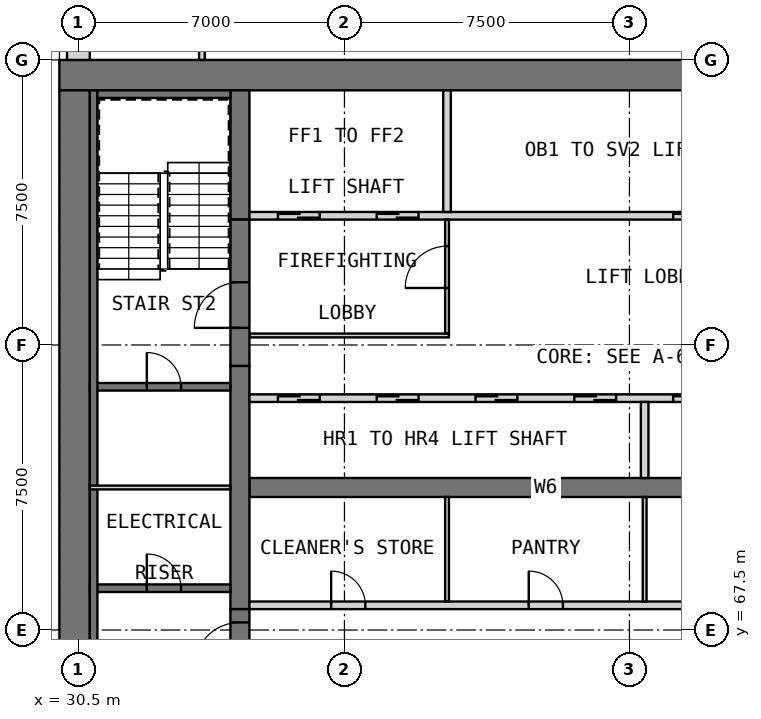
"""IFC4 building model, lengths in metres.
Left out: names, types, materials, properties, quantities, classifications, styles, units other than length and angle.
Written with IfcOpenShell. Run it as: python <this file> out.ifc"""

import sys

from ifc_helpers import new_model, si_unit, direction, frame, frame_2d, origin, place, context, subcontext, project, spatial, rectangle, extrude, element, fill, save


model = new_model("IFC4")
c1 = context("Model", 3, precision=1e-05, world=origin(), true_north=direction((0.0, 1.0)))
c2 = subcontext(c1, "Body", "Model", "MODEL_VIEW")
j1 = project(units=[si_unit("LENGTHUNIT", "METRE"), si_unit("PLANEANGLEUNIT", "RADIAN")], contexts=[c1])
p1 = place(None, origin())
s1 = spatial("IfcSite", under=j1, at=p1, CompositionType="ELEMENT")
p2 = place(p1, origin())
s2 = spatial("IfcBuilding", under=s1, at=p2, CompositionType="ELEMENT")
p3 = place(p2, frame((0.0, 0.0, 210.7)))
s3 = spatial("IfcBuildingStorey", under=s2, at=p3, CompositionType="ELEMENT", Elevation=210.7)
p4 = place(p3, frame((30.0, 82.1, 0.0), z_axis=(0.0, 0.0, 1.0), x_axis=(1.0, 0.0, 0.0)))
e1 = element("IfcWall", 1, at=p4, inside=s3, PredefinedType="SHEAR", context=c2, shape_type="SweptSolid", body=[
    extrude(rectangle(XDim=30.0, YDim=0.8, at=frame_2d((15.0, 0.0))), origin(), (0.0, 0.0, 1.0), 3.5),
])
p5 = place(p3, frame((30.4, 60.8, 0.0), z_axis=(0.0, 0.0, 1.0), x_axis=(0.0, 1.0, 0.0)))
e2 = element("IfcWall", 2, at=p5, inside=s3, PredefinedType="SHEAR", context=c2, shape_type="SweptSolid", body=[
    extrude(rectangle(XDim=20.9, YDim=0.8, at=frame_2d((10.45, 0.0))), origin(), (0.0, 0.0, 1.0), 3.5),
])
p6 = place(p3, frame((35.0, 71.25, 0.0), z_axis=(0.0, 0.0, 1.0), x_axis=(1.0, 0.0, 0.0)))
e3 = element("IfcWall", 3, at=p6, inside=s3, PredefinedType="SHEAR", context=c2, shape_type="SweptSolid", body=[
    extrude(rectangle(XDim=15.6, YDim=0.5, at=frame_2d((7.8, 0.0))), origin(), (0.0, 0.0, 1.0), 3.5),
])
p7 = place(p3, frame((34.75, 68.05, 0.0), z_axis=(0.0, 0.0, 1.0), x_axis=(0.0, 1.0, 0.0)))
e4 = element("IfcWall", 4, at=p7, inside=s3, PredefinedType="SHEAR", context=c2, shape_type="SweptSolid", body=[
    extrude(rectangle(XDim=6.4, YDim=0.5, at=frame_2d((3.2, 0.0))), origin(), (0.0, 0.0, 1.0), 3.5),
])
p8 = place(p3, frame((34.75, 78.3, 0.0), z_axis=(0.0, 0.0, 1.0), x_axis=(0.0, 1.0, 0.0)))
e5 = element("IfcWall", 5, at=p8, inside=s3, PredefinedType="SHEAR", context=c2, shape_type="SweptSolid", body=[
    extrude(rectangle(XDim=3.4, YDim=0.5, at=frame_2d((1.7, 0.0))), origin(), (0.0, 0.0, 1.0), 3.5),
])
p9 = place(p2, frame((0.0, 0.0, 34.0)))
s4 = spatial("IfcBuildingStorey", under=s2, at=p9, CompositionType="ELEMENT", Elevation=34.0)
for number, where, z_axis, x_axis in (
    (6, (29.7, 70.8, 0.0), (0.0, 0.0, 1.0), (0.0, 1.0, 0.0)),
    (7, (29.7, 75.675, 0.0), (0.0, 0.0, 1.0), (0.0, 1.0, 0.0)),
    (8, (29.7, 80.55, 0.0), (0.0, 0.0, 1.0), (0.0, 1.0, 0.0)),
):
    element("IfcWall", number, at=place(p9, frame(where, z_axis=z_axis, x_axis=x_axis)), inside=s4, PredefinedType="SOLIDWALL", context=c2, shape_type="SweptSolid", body=[
        extrude(rectangle(XDim=0.9, YDim=0.6, at=frame_2d((0.45, 0.0))), origin(), (0.0, 0.0, 1.0), 286.2),
    ])
p10 = place(p3, frame((30.5, 89.5, 0.0), z_axis=(0.0, 0.0, 1.0), x_axis=(0.0, -1.0, 0.0)))
e9 = element("IfcWall", 9, at=p10, inside=s3, PredefinedType="SOLIDWALL", context=c2, shape_type="SweptSolid", body=[
    extrude(rectangle(XDim=7.0, YDim=0.6, at=frame_2d((3.5, 0.0))), origin(), (0.0, 0.0, 1.0), 3.1),
])
p11 = place(p10, frame((3.925, 0.0, 0.8)))
e10 = element("IfcOpeningElement", 10, at=p11, cuts=e9, PredefinedType="OPENING", context=c2, shape_type="SweptSolid", body=[
    extrude(rectangle(XDim=2.4, YDim=1.8, at=frame_2d((1.2, 0.9))), frame((0.0, 0.31, 0.0), z_axis=(0.0, -1.0, 0.0), x_axis=(1.0, 0.0, 0.0)), (0.0, 0.0, 1.0), 0.62),
])
p12 = place(p10, frame((0.425, 0.0, 0.8)))
e11 = element("IfcOpeningElement", 11, at=p12, cuts=e9, PredefinedType="OPENING", context=c2, shape_type="SweptSolid", body=[
    extrude(rectangle(XDim=2.4, YDim=1.8, at=frame_2d((1.2, 0.9))), frame((0.0, 0.31, 0.0), z_axis=(0.0, -1.0, 0.0), x_axis=(1.0, 0.0, 0.0)), (0.0, 0.0, 1.0), 0.62),
])
p13 = place(p3, frame((35.0, 68.15, 0.0), z_axis=(0.0, 0.0, 1.0), x_axis=(1.0, 0.0, 0.0)))
e12 = element("IfcWall", 12, at=p13, inside=s3, PredefinedType="PARTITIONING", context=c2, shape_type="SweptSolid", body=[
    extrude(rectangle(XDim=15.6, YDim=0.2, at=frame_2d((7.8, 0.0))), origin(), (0.0, 0.0, 1.0), 3.09),
])
p14 = place(p13, frame((2.15, 0.0, 0.0)))
e13 = element("IfcOpeningElement", 13, at=p14, cuts=e12, PredefinedType="OPENING", context=c2, shape_type="SweptSolid", body=[
    extrude(rectangle(XDim=0.9, YDim=2.1, at=frame_2d((0.45, 1.05))), frame((0.0, 0.11, 0.0), z_axis=(0.0, -1.0, 0.0), x_axis=(1.0, 0.0, 0.0)), (0.0, 0.0, 1.0), 0.22),
])
p15 = place(p13, frame((7.35, 0.0, 0.0)))
e14 = element("IfcOpeningElement", 14, at=p15, cuts=e12, PredefinedType="OPENING", context=c2, shape_type="SweptSolid", body=[
    extrude(rectangle(XDim=0.9, YDim=2.1, at=frame_2d((0.45, 1.05))), frame((0.0, 0.11, 0.0), z_axis=(0.0, -1.0, 0.0), x_axis=(1.0, 0.0, 0.0)), (0.0, 0.0, 1.0), 0.22),
])
p16 = place(p13, frame((12.55, 0.0, 0.0)))
e15 = element("IfcOpeningElement", 15, at=p16, cuts=e12, PredefinedType="OPENING", context=c2, shape_type="SweptSolid", body=[
    extrude(rectangle(XDim=0.9, YDim=2.1, at=frame_2d((0.45, 1.05))), frame((0.0, 0.11, 0.0), z_axis=(0.0, -1.0, 0.0), x_axis=(1.0, 0.0, 0.0)), (0.0, 0.0, 1.0), 0.22),
])
for number, where, z_axis, x_axis in (
    (16, (40.2, 68.25, 0.0), (0.0, 0.0, 1.0), (0.0, 1.0, 0.0)),
    (17, (45.4, 68.25, 0.0), (0.0, 0.0, 1.0), (0.0, 1.0, 0.0)),
):
    element("IfcWall", number, at=place(p3, frame(where, z_axis=z_axis, x_axis=x_axis)), inside=s3, PredefinedType="PARTITIONING", context=c2, shape_type="SweptSolid", body=[
        extrude(rectangle(XDim=2.75, YDim=0.1, at=frame_2d((1.375, 0.0))), origin(), (0.0, 0.0, 1.0), 3.09),
    ])
p17 = place(p3, frame((35.0, 73.6, 0.0), z_axis=(0.0, 0.0, 1.0), x_axis=(1.0, 0.0, 0.0)))
e18 = element("IfcWall", 18, at=p17, inside=s3, PredefinedType="SOLIDWALL", context=c2, shape_type="SweptSolid", body=[
    extrude(rectangle(XDim=15.6, YDim=0.2, at=frame_2d((7.8, 0.0))), origin(), (0.0, 0.0, 1.0), 3.5),
])
p18 = place(p17, frame((0.75, 0.0, 0.0)))
e19 = element("IfcOpeningElement", 19, at=p18, cuts=e18, PredefinedType="OPENING", context=c2, shape_type="SweptSolid", body=[
    extrude(rectangle(XDim=1.1, YDim=2.1, at=frame_2d((0.55, 1.05))), frame((0.0, 0.11, 0.0), z_axis=(0.0, -1.0, 0.0), x_axis=(1.0, 0.0, 0.0)), (0.0, 0.0, 1.0), 0.22),
])
p19 = place(p17, frame((3.35, 0.0, 0.0)))
e20 = element("IfcOpeningElement", 20, at=p19, cuts=e18, PredefinedType="OPENING", context=c2, shape_type="SweptSolid", body=[
    extrude(rectangle(XDim=1.1, YDim=2.1, at=frame_2d((0.55, 1.05))), frame((0.0, 0.11, 0.0), z_axis=(0.0, -1.0, 0.0), x_axis=(1.0, 0.0, 0.0)), (0.0, 0.0, 1.0), 0.22),
])
p20 = place(p17, frame((5.95, 0.0, 0.0)))
e21 = element("IfcOpeningElement", 21, at=p20, cuts=e18, PredefinedType="OPENING", context=c2, shape_type="SweptSolid", body=[
    extrude(rectangle(XDim=1.1, YDim=2.1, at=frame_2d((0.55, 1.05))), frame((0.0, 0.11, 0.0), z_axis=(0.0, -1.0, 0.0), x_axis=(1.0, 0.0, 0.0)), (0.0, 0.0, 1.0), 0.22),
])
p21 = place(p17, frame((8.55, 0.0, 0.0)))
e22 = element("IfcOpeningElement", 22, at=p21, cuts=e18, PredefinedType="OPENING", context=c2, shape_type="SweptSolid", body=[
    extrude(rectangle(XDim=1.1, YDim=2.1, at=frame_2d((0.55, 1.05))), frame((0.0, 0.11, 0.0), z_axis=(0.0, -1.0, 0.0), x_axis=(1.0, 0.0, 0.0)), (0.0, 0.0, 1.0), 0.22),
])
p22 = place(p17, frame((11.15, 0.0, 0.0)))
e23 = element("IfcOpeningElement", 23, at=p22, cuts=e18, PredefinedType="OPENING", context=c2, shape_type="SweptSolid", body=[
    extrude(rectangle(XDim=1.1, YDim=2.1, at=frame_2d((0.55, 1.05))), frame((0.0, 0.11, 0.0), z_axis=(0.0, -1.0, 0.0), x_axis=(1.0, 0.0, 0.0)), (0.0, 0.0, 1.0), 0.22),
])
p23 = place(p17, frame((13.75, 0.0, 0.0)))
e24 = element("IfcOpeningElement", 24, at=p23, cuts=e18, PredefinedType="OPENING", context=c2, shape_type="SweptSolid", body=[
    extrude(rectangle(XDim=1.1, YDim=2.1, at=frame_2d((0.55, 1.05))), frame((0.0, 0.11, 0.0), z_axis=(0.0, -1.0, 0.0), x_axis=(1.0, 0.0, 0.0)), (0.0, 0.0, 1.0), 0.22),
])
p24 = place(p3, frame((45.4, 71.5, 0.0), z_axis=(0.0, 0.0, 1.0), x_axis=(0.0, 1.0, 0.0)))
e25 = element("IfcWall", 25, at=p24, inside=s3, PredefinedType="SOLIDWALL", context=c2, shape_type="SweptSolid", body=[
    extrude(rectangle(XDim=2.0, YDim=0.2, at=frame_2d((1.0, 0.0))), origin(), (0.0, 0.0, 1.0), 3.5),
])
p25 = place(p3, frame((35.0, 78.4, 0.0), z_axis=(0.0, 0.0, 1.0), x_axis=(1.0, 0.0, 0.0)))
e26 = element("IfcWall", 26, at=p25, inside=s3, PredefinedType="SOLIDWALL", context=c2, shape_type="SweptSolid", body=[
    extrude(rectangle(XDim=15.6, YDim=0.2, at=frame_2d((7.8, 0.0))), origin(), (0.0, 0.0, 1.0), 3.5),
])
p26 = place(p25, frame((0.75, 0.0, 0.0)))
e27 = element("IfcOpeningElement", 27, at=p26, cuts=e26, PredefinedType="OPENING", context=c2, shape_type="SweptSolid", body=[
    extrude(rectangle(XDim=1.1, YDim=2.1, at=frame_2d((0.55, 1.05))), frame((0.0, 0.11, 0.0), z_axis=(0.0, -1.0, 0.0), x_axis=(1.0, 0.0, 0.0)), (0.0, 0.0, 1.0), 0.22),
])
p27 = place(p25, frame((3.35, 0.0, 0.0)))
e28 = element("IfcOpeningElement", 28, at=p27, cuts=e26, PredefinedType="OPENING", context=c2, shape_type="SweptSolid", body=[
    extrude(rectangle(XDim=1.1, YDim=2.1, at=frame_2d((0.55, 1.05))), frame((0.0, 0.11, 0.0), z_axis=(0.0, -1.0, 0.0), x_axis=(1.0, 0.0, 0.0)), (0.0, 0.0, 1.0), 0.22),
])
p28 = place(p25, frame((11.15, 0.0, 0.0)))
e29 = element("IfcOpeningElement", 29, at=p28, cuts=e26, PredefinedType="OPENING", context=c2, shape_type="SweptSolid", body=[
    extrude(rectangle(XDim=1.1, YDim=2.1, at=frame_2d((0.55, 1.05))), frame((0.0, 0.11, 0.0), z_axis=(0.0, -1.0, 0.0), x_axis=(1.0, 0.0, 0.0)), (0.0, 0.0, 1.0), 0.22),
])
p29 = place(p25, frame((13.75, 0.0, 0.0)))
e30 = element("IfcOpeningElement", 30, at=p29, cuts=e26, PredefinedType="OPENING", context=c2, shape_type="SweptSolid", body=[
    extrude(rectangle(XDim=1.1, YDim=2.1, at=frame_2d((0.55, 1.05))), frame((0.0, 0.11, 0.0), z_axis=(0.0, -1.0, 0.0), x_axis=(1.0, 0.0, 0.0)), (0.0, 0.0, 1.0), 0.22),
])
p30 = place(p3, frame((40.2, 78.5, 0.0), z_axis=(0.0, 0.0, 1.0), x_axis=(0.0, 1.0, 0.0)))
e31 = element("IfcWall", 31, at=p30, inside=s3, PredefinedType="SOLIDWALL", context=c2, shape_type="SweptSolid", body=[
    extrude(rectangle(XDim=3.2, YDim=0.2, at=frame_2d((1.6, 0.0))), origin(), (0.0, 0.0, 1.0), 3.5),
])
p31 = place(p3, frame((35.0, 75.25, 0.0), z_axis=(0.0, 0.0, 1.0), x_axis=(1.0, 0.0, 0.0)))
e32 = element("IfcWall", 32, at=p31, inside=s3, PredefinedType="PARTITIONING", context=c2, shape_type="SweptSolid", body=[
    extrude(rectangle(XDim=5.25, YDim=0.1, at=frame_2d((2.625, 0.0))), origin(), (0.0, 0.0, 1.0), 3.09),
])
p32 = place(p3, frame((40.2, 75.3, 0.0), z_axis=(0.0, 0.0, 1.0), x_axis=(0.0, 1.0, 0.0)))
e33 = element("IfcWall", 33, at=p32, inside=s3, PredefinedType="PARTITIONING", context=c2, shape_type="SweptSolid", body=[
    extrude(rectangle(XDim=3.0, YDim=0.1, at=frame_2d((1.5, 0.0))), origin(), (0.0, 0.0, 1.0), 3.09),
])
p33 = place(p32, frame((1.2, 0.0, 0.0)))
e34 = element("IfcOpeningElement", 34, at=p33, cuts=e33, PredefinedType="OPENING", context=c2, shape_type="SweptSolid", body=[
    extrude(rectangle(XDim=1.1, YDim=2.1, at=frame_2d((0.55, 1.05))), frame((0.0, 0.06, 0.0), z_axis=(0.0, -1.0, 0.0), x_axis=(1.0, 0.0, 0.0)), (0.0, 0.0, 1.0), 0.12),
])
p34 = place(p3, frame((34.75, 64.2, 0.0), z_axis=(0.0, 0.0, 1.0), x_axis=(0.0, 1.0, 0.0)))
e35 = element("IfcWall", 35, at=p34, inside=s3, PredefinedType="SOLIDWALL", context=c2, shape_type="SweptSolid", body=[
    extrude(rectangle(XDim=3.85, YDim=0.5, at=frame_2d((1.925, 0.0))), origin(), (0.0, 0.0, 1.0), 2.3),
])
p35 = place(p34, frame((2.3, 0.0, 0.0)))
e36 = element("IfcOpeningElement", 36, at=p35, cuts=e35, PredefinedType="OPENING", context=c2, shape_type="SweptSolid", body=[
    extrude(rectangle(XDim=1.2, YDim=2.1, at=frame_2d((0.6, 1.05))), frame((0.0, 0.26, 0.0), z_axis=(0.0, -1.0, 0.0), x_axis=(1.0, 0.0, 0.0)), (0.0, 0.0, 1.0), 0.52),
])
p36 = place(p3, frame((34.75, 74.45, 0.0), z_axis=(0.0, 0.0, 1.0), x_axis=(0.0, 1.0, 0.0)))
e37 = element("IfcWall", 37, at=p36, inside=s3, PredefinedType="SOLIDWALL", context=c2, shape_type="SweptSolid", body=[
    extrude(rectangle(XDim=3.85, YDim=0.5, at=frame_2d((1.925, 0.0))), origin(), (0.0, 0.0, 1.0), 2.3),
])
p37 = place(p36, frame((1.0, 0.0, 0.0)))
e38 = element("IfcOpeningElement", 38, at=p37, cuts=e37, PredefinedType="OPENING", context=c2, shape_type="SweptSolid", body=[
    extrude(rectangle(XDim=1.2, YDim=2.1, at=frame_2d((0.6, 1.05))), frame((0.0, 0.26, 0.0), z_axis=(0.0, -1.0, 0.0), x_axis=(1.0, 0.0, 0.0)), (0.0, 0.0, 1.0), 0.52),
])
p38 = place(p3, frame((30.8, 68.6, 0.0), z_axis=(0.0, 0.0, 1.0), x_axis=(1.0, 0.0, 0.0)))
e39 = element("IfcWall", 39, at=p38, inside=s3, PredefinedType="SOLIDWALL", context=c2, shape_type="SweptSolid", body=[
    extrude(rectangle(XDim=3.7, YDim=0.2, at=frame_2d((1.85, 0.0))), origin(), (0.0, 0.0, 1.0), 3.09),
])
p39 = place(p38, frame((1.5, 0.0, 0.0)))
e40 = element("IfcOpeningElement", 40, at=p39, cuts=e39, PredefinedType="OPENING", context=c2, shape_type="SweptSolid", body=[
    extrude(rectangle(XDim=0.9, YDim=2.1, at=frame_2d((0.45, 1.05))), frame((0.0, 0.11, 0.0), z_axis=(0.0, -1.0, 0.0), x_axis=(1.0, 0.0, 0.0)), (0.0, 0.0, 1.0), 0.22),
])
p40 = place(p3, frame((30.8, 73.9, 0.0), z_axis=(0.0, 0.0, 1.0), x_axis=(1.0, 0.0, 0.0)))
e41 = element("IfcWall", 41, at=p40, inside=s3, PredefinedType="SOLIDWALL", context=c2, shape_type="SweptSolid", body=[
    extrude(rectangle(XDim=3.7, YDim=0.2, at=frame_2d((1.85, 0.0))), origin(), (0.0, 0.0, 1.0), 3.09),
])
p41 = place(p40, frame((1.5, 0.0, 0.0)))
e42 = element("IfcOpeningElement", 42, at=p41, cuts=e41, PredefinedType="OPENING", context=c2, shape_type="SweptSolid", body=[
    extrude(rectangle(XDim=0.9, YDim=2.1, at=frame_2d((0.45, 1.05))), frame((0.0, 0.11, 0.0), z_axis=(0.0, -1.0, 0.0), x_axis=(1.0, 0.0, 0.0)), (0.0, 0.0, 1.0), 0.22),
])
p42 = place(p3, frame((30.9, 60.8, 0.0), z_axis=(0.0, 0.0, 1.0), x_axis=(0.0, 1.0, 0.0)))
e43 = element("IfcWall", 43, at=p42, inside=s3, PredefinedType="SOLIDWALL", context=c2, shape_type="SweptSolid", body=[
    extrude(rectangle(XDim=20.9, YDim=0.2, at=frame_2d((10.45, 0.0))), origin(), (0.0, 0.0, 1.0), 3.09),
])
p43 = place(p3, frame((31.0, 81.6, 0.0), z_axis=(0.0, 0.0, 1.0), x_axis=(1.0, 0.0, 0.0)))
e44 = element("IfcWall", 44, at=p43, inside=s3, PredefinedType="SOLIDWALL", context=c2, shape_type="SweptSolid", body=[
    extrude(rectangle(XDim=3.5, YDim=0.2, at=frame_2d((1.75, 0.0))), origin(), (0.0, 0.0, 1.0), 3.09),
])
p44 = place(p3, frame((30.8, 71.25, 0.0), z_axis=(0.0, 0.0, 1.0), x_axis=(1.0, 0.0, 0.0)))
e45 = element("IfcWall", 45, at=p44, inside=s3, PredefinedType="PARTITIONING", context=c2, shape_type="SweptSolid", body=[
    extrude(rectangle(XDim=3.7, YDim=0.1, at=frame_2d((1.85, 0.0))), origin(), (0.0, 0.0, 1.0), 3.09),
])
p45 = place(p3, frame((33.75, 82.5, 0.0), z_axis=(0.0, 0.0, 1.0), x_axis=(0.0, 1.0, 0.0)))
e46 = element("IfcWall", 46, at=p45, inside=s3, PredefinedType="PARTITIONING", context=c2, shape_type="SweptSolid", body=[
    extrude(rectangle(XDim=2.025, YDim=0.15, at=frame_2d((1.012, 0.0))), origin(), (0.0, 0.0, 1.0), 3.1),
])
p46 = place(p14, origin())
e47 = element("IfcDoor", 47, at=p46, inside=s3, OperationType="SINGLE_SWING_RIGHT", PredefinedType="DOOR", context=c2, shape_type="SweptSolid", body=[
    extrude(rectangle(XDim=0.9, YDim=2.1, at=frame_2d((0.45, 1.05))), frame((0.0, 0.025, 0.0), z_axis=(0.0, -1.0, 0.0), x_axis=(1.0, 0.0, 0.0)), (0.0, 0.0, 1.0), 0.05),
])
fill(e13, e47)
p47 = place(p15, origin())
e48 = element("IfcDoor", 48, at=p47, inside=s3, OperationType="SINGLE_SWING_LEFT", PredefinedType="DOOR", context=c2, shape_type="SweptSolid", body=[
    extrude(rectangle(XDim=0.9, YDim=2.1, at=frame_2d((0.45, 1.05))), frame((0.0, 0.025, 0.0), z_axis=(0.0, -1.0, 0.0), x_axis=(1.0, 0.0, 0.0)), (0.0, 0.0, 1.0), 0.05),
])
fill(e14, e48)
p48 = place(p18, origin())
e49 = element("IfcDoor", 49, at=p48, inside=s3, OperationType="DOUBLE_DOOR_SLIDING", PredefinedType="DOOR", context=c2, shape_type="SweptSolid", body=[
    extrude(rectangle(XDim=1.1, YDim=2.1, at=frame_2d((0.55, 1.05))), frame((0.0, 0.025, 0.0), z_axis=(0.0, -1.0, 0.0), x_axis=(1.0, 0.0, 0.0)), (0.0, 0.0, 1.0), 0.05),
])
fill(e19, e49)
p49 = place(p19, origin())
e50 = element("IfcDoor", 50, at=p49, inside=s3, OperationType="DOUBLE_DOOR_SLIDING", PredefinedType="DOOR", context=c2, shape_type="SweptSolid", body=[
    extrude(rectangle(XDim=1.1, YDim=2.1, at=frame_2d((0.55, 1.05))), frame((0.0, 0.025, 0.0), z_axis=(0.0, -1.0, 0.0), x_axis=(1.0, 0.0, 0.0)), (0.0, 0.0, 1.0), 0.05),
])
fill(e20, e50)
p50 = place(p20, origin())
e51 = element("IfcDoor", 51, at=p50, inside=s3, OperationType="DOUBLE_DOOR_SLIDING", PredefinedType="DOOR", context=c2, shape_type="SweptSolid", body=[
    extrude(rectangle(XDim=1.1, YDim=2.1, at=frame_2d((0.55, 1.05))), frame((0.0, 0.025, 0.0), z_axis=(0.0, -1.0, 0.0), x_axis=(1.0, 0.0, 0.0)), (0.0, 0.0, 1.0), 0.05),
])
fill(e21, e51)
p51 = place(p21, origin())
e52 = element("IfcDoor", 52, at=p51, inside=s3, OperationType="DOUBLE_DOOR_SLIDING", PredefinedType="DOOR", context=c2, shape_type="SweptSolid", body=[
    extrude(rectangle(XDim=1.1, YDim=2.1, at=frame_2d((0.55, 1.05))), frame((0.0, 0.025, 0.0), z_axis=(0.0, -1.0, 0.0), x_axis=(1.0, 0.0, 0.0)), (0.0, 0.0, 1.0), 0.05),
])
fill(e22, e52)
p52 = place(p22, origin())
e53 = element("IfcDoor", 53, at=p52, inside=s3, OperationType="DOUBLE_DOOR_SLIDING", PredefinedType="DOOR", context=c2, shape_type="SweptSolid", body=[
    extrude(rectangle(XDim=1.1, YDim=2.1, at=frame_2d((0.55, 1.05))), frame((0.0, 0.025, 0.0), z_axis=(0.0, -1.0, 0.0), x_axis=(1.0, 0.0, 0.0)), (0.0, 0.0, 1.0), 0.05),
])
fill(e23, e53)
p53 = place(p26, origin())
e54 = element("IfcDoor", 54, at=p53, inside=s3, OperationType="DOUBLE_DOOR_SLIDING", PredefinedType="DOOR", context=c2, shape_type="SweptSolid", body=[
    extrude(rectangle(XDim=1.1, YDim=2.1, at=frame_2d((0.55, 1.05))), frame((0.0, 0.025, 0.0), z_axis=(0.0, -1.0, 0.0), x_axis=(1.0, 0.0, 0.0)), (0.0, 0.0, 1.0), 0.05),
])
fill(e27, e54)
p54 = place(p27, origin())
e55 = element("IfcDoor", 55, at=p54, inside=s3, OperationType="DOUBLE_DOOR_SLIDING", PredefinedType="DOOR", context=c2, shape_type="SweptSolid", body=[
    extrude(rectangle(XDim=1.1, YDim=2.1, at=frame_2d((0.55, 1.05))), frame((0.0, 0.025, 0.0), z_axis=(0.0, -1.0, 0.0), x_axis=(1.0, 0.0, 0.0)), (0.0, 0.0, 1.0), 0.05),
])
fill(e28, e55)
p55 = place(p28, origin())
e56 = element("IfcDoor", 56, at=p55, inside=s3, OperationType="DOUBLE_DOOR_SLIDING", PredefinedType="DOOR", context=c2, shape_type="SweptSolid", body=[
    extrude(rectangle(XDim=1.1, YDim=2.1, at=frame_2d((0.55, 1.05))), frame((0.0, 0.025, 0.0), z_axis=(0.0, -1.0, 0.0), x_axis=(1.0, 0.0, 0.0)), (0.0, 0.0, 1.0), 0.05),
])
fill(e29, e56)
p56 = place(p33, origin())
e57 = element("IfcDoor", 57, at=p56, inside=s3, OperationType="SINGLE_SWING_LEFT", PredefinedType="DOOR", context=c2, shape_type="SweptSolid", body=[
    extrude(rectangle(XDim=1.1, YDim=2.1, at=frame_2d((0.55, 1.05))), frame((0.0, 0.025, 0.0), z_axis=(0.0, -1.0, 0.0), x_axis=(1.0, 0.0, 0.0)), (0.0, 0.0, 1.0), 0.05),
])
fill(e34, e57)
p57 = place(p35, origin())
e58 = element("IfcDoor", 58, at=p57, inside=s3, OperationType="SINGLE_SWING_LEFT", PredefinedType="DOOR", context=c2, shape_type="SweptSolid", body=[
    extrude(rectangle(XDim=1.2, YDim=2.1, at=frame_2d((0.6, 1.05))), frame((0.0, 0.025, 0.0), z_axis=(0.0, -1.0, 0.0), x_axis=(1.0, 0.0, 0.0)), (0.0, 0.0, 1.0), 0.05),
])
fill(e36, e58)
p58 = place(p37, origin())
e59 = element("IfcDoor", 59, at=p58, inside=s3, OperationType="SINGLE_SWING_RIGHT", PredefinedType="DOOR", context=c2, shape_type="SweptSolid", body=[
    extrude(rectangle(XDim=1.2, YDim=2.1, at=frame_2d((0.6, 1.05))), frame((0.0, 0.025, 0.0), z_axis=(0.0, -1.0, 0.0), x_axis=(1.0, 0.0, 0.0)), (0.0, 0.0, 1.0), 0.05),
])
fill(e38, e59)
p59 = place(p39, origin())
e60 = element("IfcDoor", 60, at=p59, inside=s3, OperationType="SINGLE_SWING_LEFT", PredefinedType="DOOR", context=c2, shape_type="SweptSolid", body=[
    extrude(rectangle(XDim=0.9, YDim=2.1, at=frame_2d((0.45, 1.05))), frame((0.0, 0.025, 0.0), z_axis=(0.0, -1.0, 0.0), x_axis=(1.0, 0.0, 0.0)), (0.0, 0.0, 1.0), 0.05),
])
fill(e40, e60)
p60 = place(p41, origin())
e61 = element("IfcDoor", 61, at=p60, inside=s3, OperationType="SINGLE_SWING_RIGHT", PredefinedType="DOOR", context=c2, shape_type="SweptSolid", body=[
    extrude(rectangle(XDim=0.9, YDim=2.1, at=frame_2d((0.45, 1.05))), frame((0.0, 0.025, 0.0), z_axis=(0.0, -1.0, 0.0), x_axis=(1.0, 0.0, 0.0)), (0.0, 0.0, 1.0), 0.05),
])
fill(e42, e61)
save(model, sys.argv[1])
